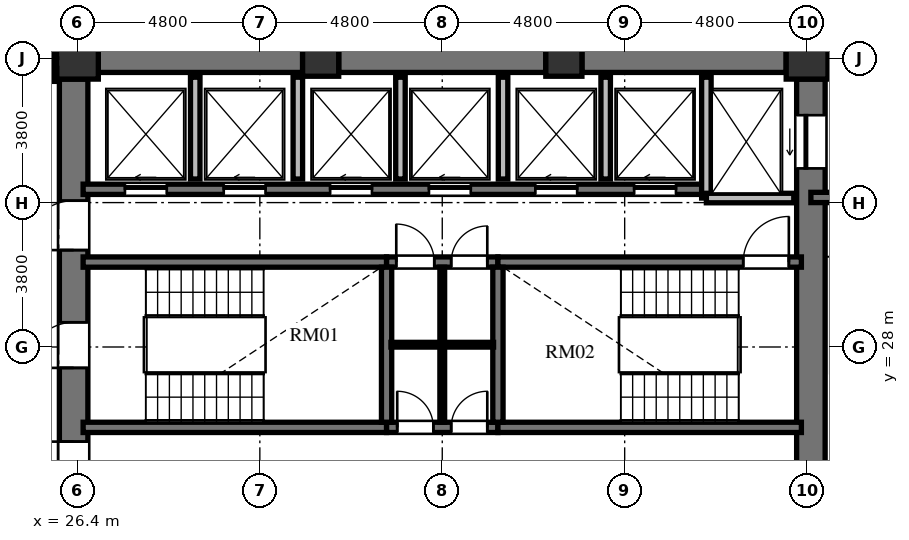
"""IFC4 building model, lengths in metres.
Left out: names, types, materials, properties, quantities, classifications, styles, units other than length and angle.
Written with IfcOpenShell. Run it as: python <this file> out.ifc"""

import sys

from ifc_helpers import new_model, si_unit, direction, frame, frame_2d, origin, origin_2d, place, context, subcontext, project, spatial, rectangle, extrude, element, fill, save


model = new_model("IFC4")
c1 = context("Model", 3, precision=1e-05, world=origin(), true_north=direction((0.0, 1.0)))
c2 = subcontext(c1, "Body", "Model", "MODEL_VIEW")
j1 = project(units=[si_unit("LENGTHUNIT", "METRE"), si_unit("PLANEANGLEUNIT", "RADIAN")], contexts=[c1])
p1 = place(None, origin())
s1 = spatial("IfcSite", under=j1, at=p1, CompositionType="ELEMENT")
p2 = place(p1, origin())
s2 = spatial("IfcBuilding", under=s1, at=p2, CompositionType="ELEMENT")
p3 = place(p2, frame((0.0, 0.0, 114.576)))
s3 = spatial("IfcBuildingStorey", under=s2, at=p3, CompositionType="ELEMENT", Elevation=114.576)
p4 = place(p3, frame((45.6, 35.6, 0.0), z_axis=(0.0, 0.0, 1.0), x_axis=(1.0, 0.0, 0.0)))
e1 = element("IfcColumn", 1, at=p4, inside=s3, PredefinedType="COLUMN", context=c2, shape_type="SweptSolid", body=[
    extrude(rectangle(XDim=1.1, YDim=1.1, at=origin_2d()), origin(), (0.0, 0.0, 1.0), 3.648),
])
for number, where, z_axis, x_axis in (
    (2, (39.2, 35.6, 0.0), (0.0, 0.0, 1.0), (1.0, 0.0, 0.0)),
    (3, (32.8, 35.6, 0.0), (0.0, 0.0, 1.0), (1.0, 0.0, 0.0)),
):
    element("IfcColumn", number, at=place(p3, frame(where, z_axis=z_axis, x_axis=x_axis)), inside=s3, PredefinedType="COLUMN", context=c2, shape_type="SweptSolid", body=[
        extrude(rectangle(XDim=0.95, YDim=0.95, at=origin_2d()), origin(), (0.0, 0.0, 1.0), 3.648),
    ])
p5 = place(p3, frame((26.4, 35.6, 0.0), z_axis=(0.0, 0.0, 1.0), x_axis=(1.0, 0.0, 0.0)))
e4 = element("IfcColumn", 4, at=p5, inside=s3, PredefinedType="COLUMN", context=c2, shape_type="SweptSolid", body=[
    extrude(rectangle(XDim=1.1, YDim=1.1, at=origin_2d()), origin(), (0.0, 0.0, 1.0), 3.648),
])
p6 = place(p3, frame((26.3, 20.95, 0.0), z_axis=(0.0, 0.0, 1.0), x_axis=(0.0, 1.0, 0.0)))
e5 = element("IfcWall", 5, at=p6, inside=s3, PredefinedType="SHEAR", context=c2, shape_type="SweptSolid", body=[
    extrude(rectangle(XDim=14.1, YDim=0.75, at=frame_2d((7.05, 0.0))), origin(), (0.0, 0.0, 1.0), 3.648),
])
p7 = place(p6, frame((6.5, 0.0, 0.0)))
e6 = element("IfcOpeningElement", 6, at=p7, cuts=e5, PredefinedType="OPENING", context=c2, shape_type="SweptSolid", body=[
    extrude(rectangle(XDim=1.2, YDim=2.15, at=frame_2d((0.6, 1.075))), frame((0.0, 0.385, 0.0), z_axis=(0.0, -1.0, 0.0), x_axis=(1.0, 0.0, 0.0)), (0.0, 0.0, 1.0), 0.77),
])
p8 = place(p6, frame((9.6, 0.0, 0.0)))
e7 = element("IfcOpeningElement", 7, at=p8, cuts=e5, PredefinedType="OPENING", context=c2, shape_type="SweptSolid", body=[
    extrude(rectangle(XDim=1.3, YDim=2.2, at=frame_2d((0.65, 1.1))), frame((0.0, 0.385, 0.0), z_axis=(0.0, -1.0, 0.0), x_axis=(1.0, 0.0, 0.0)), (0.0, 0.0, 1.0), 0.77),
])
p9 = place(p6, frame((3.26, 0.0, 0.0)))
e8 = element("IfcOpeningElement", 8, at=p9, cuts=e5, PredefinedType="OPENING", context=c2, shape_type="SweptSolid", body=[
    extrude(rectangle(XDim=1.3, YDim=2.2, at=frame_2d((0.65, 1.1))), frame((0.0, 0.385, 0.0), z_axis=(0.0, -1.0, 0.0), x_axis=(1.0, 0.0, 0.0)), (0.0, 0.0, 1.0), 0.77),
])
p10 = place(p3, frame((45.7, 20.95, 0.0), z_axis=(0.0, 0.0, 1.0), x_axis=(0.0, 1.0, 0.0)))
e9 = element("IfcWall", 9, at=p10, inside=s3, PredefinedType="SHEAR", context=c2, shape_type="SweptSolid", body=[
    extrude(rectangle(XDim=14.1, YDim=0.75, at=frame_2d((7.05, 0.0))), origin(), (0.0, 0.0, 1.0), 3.648),
])
p11 = place(p10, frame((11.75, 0.0, 0.0)))
e10 = element("IfcOpeningElement", 10, at=p11, cuts=e9, PredefinedType="OPENING", context=c2, shape_type="SweptSolid", body=[
    extrude(rectangle(XDim=1.4, YDim=2.3, at=frame_2d((0.7, 1.15))), frame((0.0, 0.385, 0.0), z_axis=(0.0, -1.0, 0.0), x_axis=(1.0, 0.0, 0.0)), (0.0, 0.0, 1.0), 0.77),
])
p12 = place(p10, frame((0.95, 0.0, 0.0)))
e11 = element("IfcOpeningElement", 11, at=p12, cuts=e9, PredefinedType="OPENING", context=c2, shape_type="SweptSolid", body=[
    extrude(rectangle(XDim=1.4, YDim=2.3, at=frame_2d((0.7, 1.15))), frame((0.0, 0.385, 0.0), z_axis=(0.0, -1.0, 0.0), x_axis=(1.0, 0.0, 0.0)), (0.0, 0.0, 1.0), 0.77),
])
p13 = place(p3, frame((26.95, 35.6, 0.0), z_axis=(0.0, 0.0, 1.0), x_axis=(1.0, 0.0, 0.0)))
e12 = element("IfcWall", 12, at=p13, inside=s3, PredefinedType="SHEAR", context=c2, shape_type="SweptSolid", body=[
    extrude(rectangle(XDim=5.375, YDim=0.75, at=frame_2d((2.688, 0.0))), origin(), (0.0, 0.0, 1.0), 3.648),
])
p14 = place(p3, frame((33.275, 35.6, 0.0), z_axis=(0.0, 0.0, 1.0), x_axis=(1.0, 0.0, 0.0)))
e13 = element("IfcWall", 13, at=p14, inside=s3, PredefinedType="SHEAR", context=c2, shape_type="SweptSolid", body=[
    extrude(rectangle(XDim=5.45, YDim=0.75, at=frame_2d((2.725, 0.0))), origin(), (0.0, 0.0, 1.0), 3.648),
])
p15 = place(p3, frame((39.675, 35.6, 0.0), z_axis=(0.0, 0.0, 1.0), x_axis=(1.0, 0.0, 0.0)))
e14 = element("IfcWall", 14, at=p15, inside=s3, PredefinedType="SHEAR", context=c2, shape_type="SweptSolid", body=[
    extrude(rectangle(XDim=5.375, YDim=0.75, at=frame_2d((2.688, 0.0))), origin(), (0.0, 0.0, 1.0), 3.648),
])
p16 = place(p3, frame((26.55, 30.235, 0.0), z_axis=(0.0, 0.0, 1.0), x_axis=(1.0, 0.0, 0.0)))
e15 = element("IfcWall", 15, at=p16, inside=s3, PredefinedType="SHEAR", context=c2, shape_type="SweptSolid", body=[
    extrude(rectangle(XDim=7.985, YDim=0.27, at=frame_2d((3.992, 0.0))), origin(), (0.0, 0.0, 1.0), 3.648),
])
p17 = place(p3, frame((34.535, 30.235, 0.0), z_axis=(0.0, 0.0, 1.0), x_axis=(1.0, 0.0, 0.0)))
e16 = element("IfcWall", 16, at=p17, inside=s3, PredefinedType="SHEAR", context=c2, shape_type="SweptSolid", body=[
    extrude(rectangle(XDim=2.93, YDim=0.27, at=frame_2d((1.465, 0.0))), origin(), (0.0, 0.0, 1.0), 3.648),
])
p18 = place(p17, frame((0.255, 0.0, 0.0)))
e17 = element("IfcOpeningElement", 17, at=p18, cuts=e16, PredefinedType="OPENING", context=c2, shape_type="SweptSolid", body=[
    extrude(rectangle(XDim=1.0, YDim=2.1, at=frame_2d((0.5, 1.05))), frame((0.0, 0.145, 0.0), z_axis=(0.0, -1.0, 0.0), x_axis=(1.0, 0.0, 0.0)), (0.0, 0.0, 1.0), 0.29),
])
p19 = place(p17, frame((1.7, 0.0, 0.0)))
e18 = element("IfcOpeningElement", 18, at=p19, cuts=e16, PredefinedType="OPENING", context=c2, shape_type="SweptSolid", body=[
    extrude(rectangle(XDim=0.95, YDim=2.1, at=frame_2d((0.475, 1.05))), frame((0.0, 0.145, 0.0), z_axis=(0.0, -1.0, 0.0), x_axis=(1.0, 0.0, 0.0)), (0.0, 0.0, 1.0), 0.29),
])
p20 = place(p3, frame((37.465, 30.235, 0.0), z_axis=(0.0, 0.0, 1.0), x_axis=(1.0, 0.0, 0.0)))
e19 = element("IfcWall", 19, at=p20, inside=s3, PredefinedType="SHEAR", context=c2, shape_type="SweptSolid", body=[
    extrude(rectangle(XDim=7.985, YDim=0.27, at=frame_2d((3.992, 0.0))), origin(), (0.0, 0.0, 1.0), 3.648),
])
p21 = place(p20, frame((6.455, 0.0, 0.0)))
e20 = element("IfcOpeningElement", 20, at=p21, cuts=e19, PredefinedType="OPENING", context=c2, shape_type="SweptSolid", body=[
    extrude(rectangle(XDim=1.2, YDim=2.15, at=frame_2d((0.6, 1.075))), frame((0.0, 0.145, 0.0), z_axis=(0.0, -1.0, 0.0), x_axis=(1.0, 0.0, 0.0)), (0.0, 0.0, 1.0), 0.29),
])
p22 = place(p3, frame((26.55, 25.885, 0.0), z_axis=(0.0, 0.0, 1.0), x_axis=(1.0, 0.0, 0.0)))
e21 = element("IfcWall", 21, at=p22, inside=s3, PredefinedType="SHEAR", context=c2, shape_type="SweptSolid", body=[
    extrude(rectangle(XDim=7.985, YDim=0.27, at=frame_2d((3.992, 0.0))), origin(), (0.0, 0.0, 1.0), 3.648),
])
p23 = place(p3, frame((34.535, 25.885, 0.0), z_axis=(0.0, 0.0, 1.0), x_axis=(1.0, 0.0, 0.0)))
e22 = element("IfcWall", 22, at=p23, inside=s3, PredefinedType="SHEAR", context=c2, shape_type="SweptSolid", body=[
    extrude(rectangle(XDim=2.93, YDim=0.27, at=frame_2d((1.465, 0.0))), origin(), (0.0, 0.0, 1.0), 3.648),
])
p24 = place(p23, frame((0.28, 0.0, 0.0)))
e23 = element("IfcOpeningElement", 23, at=p24, cuts=e22, PredefinedType="OPENING", context=c2, shape_type="SweptSolid", body=[
    extrude(rectangle(XDim=0.95, YDim=2.1, at=frame_2d((0.475, 1.05))), frame((0.0, 0.145, 0.0), z_axis=(0.0, -1.0, 0.0), x_axis=(1.0, 0.0, 0.0)), (0.0, 0.0, 1.0), 0.29),
])
p25 = place(p23, frame((1.7, 0.0, 0.0)))
e24 = element("IfcOpeningElement", 24, at=p25, cuts=e22, PredefinedType="OPENING", context=c2, shape_type="SweptSolid", body=[
    extrude(rectangle(XDim=0.95, YDim=2.1, at=frame_2d((0.475, 1.05))), frame((0.0, 0.145, 0.0), z_axis=(0.0, -1.0, 0.0), x_axis=(1.0, 0.0, 0.0)), (0.0, 0.0, 1.0), 0.29),
])
p26 = place(p3, frame((37.465, 25.885, 0.0), z_axis=(0.0, 0.0, 1.0), x_axis=(1.0, 0.0, 0.0)))
e25 = element("IfcWall", 25, at=p26, inside=s3, PredefinedType="SHEAR", context=c2, shape_type="SweptSolid", body=[
    extrude(rectangle(XDim=7.985, YDim=0.27, at=frame_2d((3.992, 0.0))), origin(), (0.0, 0.0, 1.0), 3.648),
])
for number, where, z_axis, x_axis in (
    (26, (34.535, 26.02, 0.0), (0.0, 0.0, 1.0), (0.0, 1.0, 0.0)),
    (27, (37.465, 26.02, 0.0), (0.0, 0.0, 1.0), (0.0, 1.0, 0.0)),
):
    element("IfcWall", number, at=place(p3, frame(where, z_axis=z_axis, x_axis=x_axis)), inside=s3, PredefinedType="SHEAR", context=c2, shape_type="SweptSolid", body=[
        extrude(rectangle(XDim=4.08, YDim=0.27, at=frame_2d((2.04, 0.0))), origin(), (0.0, 0.0, 1.0), 3.648),
    ])
p27 = place(p3, frame((34.65, 28.06, 0.0), z_axis=(0.0, 0.0, 1.0), x_axis=(1.0, 0.0, 0.0)))
e28 = element("IfcWall", 28, at=p27, inside=s3, PredefinedType="PARTITIONING", context=c2, shape_type="SweptSolid", body=[
    extrude(rectangle(XDim=2.7, YDim=0.125, at=frame_2d((1.35, 0.0))), origin(), (0.0, 0.0, 1.0), 3.428),
])
p28 = place(p3, frame((36.0, 26.02, 0.0), z_axis=(0.0, 0.0, 1.0), x_axis=(0.0, 1.0, 0.0)))
e29 = element("IfcWall", 29, at=p28, inside=s3, PredefinedType="PARTITIONING", context=c2, shape_type="SweptSolid", body=[
    extrude(rectangle(XDim=4.08, YDim=0.125, at=frame_2d((2.04, 0.0))), origin(), (0.0, 0.0, 1.0), 3.428),
])
p29 = place(p3, frame((26.55, 32.15, 0.0), z_axis=(0.0, 0.0, 1.0), x_axis=(1.0, 0.0, 0.0)))
e30 = element("IfcWall", 30, at=p29, inside=s3, PredefinedType="SHEAR", context=c2, shape_type="SweptSolid", body=[
    extrude(rectangle(XDim=16.4, YDim=0.27, at=frame_2d((8.2, 0.0))), origin(), (0.0, 0.0, 1.0), 3.648),
])
p30 = place(p29, frame((1.1, 0.0, 0.0)))
e31 = element("IfcOpeningElement", 31, at=p30, cuts=e30, PredefinedType="OPENING", context=c2, shape_type="SweptSolid", body=[
    extrude(rectangle(XDim=1.1, YDim=2.2, at=frame_2d((0.55, 1.1))), frame((0.0, 0.145, 0.0), z_axis=(0.0, -1.0, 0.0), x_axis=(1.0, 0.0, 0.0)), (0.0, 0.0, 1.0), 0.29),
])
p31 = place(p29, frame((3.7, 0.0, 0.0)))
e32 = element("IfcOpeningElement", 32, at=p31, cuts=e30, PredefinedType="OPENING", context=c2, shape_type="SweptSolid", body=[
    extrude(rectangle(XDim=1.1, YDim=2.2, at=frame_2d((0.55, 1.1))), frame((0.0, 0.145, 0.0), z_axis=(0.0, -1.0, 0.0), x_axis=(1.0, 0.0, 0.0)), (0.0, 0.0, 1.0), 0.29),
])
p32 = place(p29, frame((6.5, 0.0, 0.0)))
e33 = element("IfcOpeningElement", 33, at=p32, cuts=e30, PredefinedType="OPENING", context=c2, shape_type="SweptSolid", body=[
    extrude(rectangle(XDim=1.1, YDim=2.2, at=frame_2d((0.55, 1.1))), frame((0.0, 0.145, 0.0), z_axis=(0.0, -1.0, 0.0), x_axis=(1.0, 0.0, 0.0)), (0.0, 0.0, 1.0), 0.29),
])
p33 = place(p29, frame((9.1, 0.0, 0.0)))
e34 = element("IfcOpeningElement", 34, at=p33, cuts=e30, PredefinedType="OPENING", context=c2, shape_type="SweptSolid", body=[
    extrude(rectangle(XDim=1.1, YDim=2.2, at=frame_2d((0.55, 1.1))), frame((0.0, 0.145, 0.0), z_axis=(0.0, -1.0, 0.0), x_axis=(1.0, 0.0, 0.0)), (0.0, 0.0, 1.0), 0.29),
])
p34 = place(p29, frame((11.9, 0.0, 0.0)))
e35 = element("IfcOpeningElement", 35, at=p34, cuts=e30, PredefinedType="OPENING", context=c2, shape_type="SweptSolid", body=[
    extrude(rectangle(XDim=1.1, YDim=2.2, at=frame_2d((0.55, 1.1))), frame((0.0, 0.145, 0.0), z_axis=(0.0, -1.0, 0.0), x_axis=(1.0, 0.0, 0.0)), (0.0, 0.0, 1.0), 0.29),
])
p35 = place(p29, frame((14.5, 0.0, 0.0)))
e36 = element("IfcOpeningElement", 36, at=p35, cuts=e30, PredefinedType="OPENING", context=c2, shape_type="SweptSolid", body=[
    extrude(rectangle(XDim=1.1, YDim=2.2, at=frame_2d((0.55, 1.1))), frame((0.0, 0.145, 0.0), z_axis=(0.0, -1.0, 0.0), x_axis=(1.0, 0.0, 0.0)), (0.0, 0.0, 1.0), 0.29),
])
p36 = place(p3, frame((42.95, 31.92, 0.0), z_axis=(0.0, 0.0, 1.0), x_axis=(0.0, 1.0, 0.0)))
e37 = element("IfcWall", 37, at=p36, inside=s3, PredefinedType="SOLIDWALL", context=c2, shape_type="SweptSolid", body=[
    extrude(rectangle(XDim=3.18, YDim=0.25, at=frame_2d((1.59, 0.0))), origin(), (0.0, 0.0, 1.0), 3.428),
])
p37 = place(p3, frame((42.95, 31.92, 0.0), z_axis=(0.0, 0.0, 1.0), x_axis=(1.0, 0.0, 0.0)))
e38 = element("IfcWall", 38, at=p37, inside=s3, PredefinedType="SOLIDWALL", context=c2, shape_type="SweptSolid", body=[
    extrude(rectangle(XDim=2.3, YDim=0.25, at=frame_2d((1.15, 0.0))), origin(), (0.0, 0.0, 1.0), 3.428),
])
for number, where, z_axis, x_axis in (
    (39, (29.5, 32.42, 0.0), (0.0, 0.0, 1.0), (0.0, 1.0, 0.0)),
    (40, (32.2, 32.42, 0.0), (0.0, 0.0, 1.0), (0.0, 1.0, 0.0)),
    (41, (34.9, 32.42, 0.0), (0.0, 0.0, 1.0), (0.0, 1.0, 0.0)),
    (42, (37.6, 32.42, 0.0), (0.0, 0.0, 1.0), (0.0, 1.0, 0.0)),
    (43, (40.3, 32.42, 0.0), (0.0, 0.0, 1.0), (0.0, 1.0, 0.0)),
):
    element("IfcWall", number, at=place(p3, frame(where, z_axis=z_axis, x_axis=x_axis)), inside=s3, PredefinedType="SOLIDWALL", context=c2, shape_type="SweptSolid", body=[
        extrude(rectangle(XDim=2.68, YDim=0.25, at=frame_2d((1.34, 0.0))), origin(), (0.0, 0.0, 1.0), 3.428),
    ])
p38 = place(p3, frame((45.7, 31.935, 0.0), z_axis=(0.0, 0.0, 1.0), x_axis=(1.0, 0.0, 0.0)))
e44 = element("IfcWall", 44, at=p38, inside=s3, PredefinedType="SHEAR", context=c2, shape_type="SweptSolid", body=[
    extrude(rectangle(XDim=4.715, YDim=0.27, at=frame_2d((2.357, 0.0))), origin(), (0.0, 0.0, 1.0), 3.648),
])
p39 = place(p3, frame((25.83, 36.21, 0.0), z_axis=(0.0, 0.0, 1.0), x_axis=(0.0, -1.0, 0.0)))
e45 = element("IfcWall", 45, at=p39, inside=s3, PredefinedType="PARTITIONING", context=c2, shape_type="SweptSolid", body=[
    extrude(rectangle(XDim=1.22, YDim=0.18, at=frame_2d((0.61, 0.0))), origin(), (0.0, 0.0, 1.0), 3.428),
])
p40 = place(p7, origin())
e46 = element("IfcDoor", 46, at=p40, inside=s3, OperationType="SINGLE_SWING_LEFT", PredefinedType="DOOR", context=c2, shape_type="SweptSolid", body=[
    extrude(rectangle(XDim=1.2, YDim=2.15, at=frame_2d((0.6, 1.075))), frame((0.0, 0.025, 0.0), z_axis=(0.0, -1.0, 0.0), x_axis=(1.0, 0.0, 0.0)), (0.0, 0.0, 1.0), 0.05),
])
fill(e6, e46)
p41 = place(p21, origin())
e47 = element("IfcDoor", 47, at=p41, inside=s3, OperationType="SINGLE_SWING_RIGHT", PredefinedType="DOOR", context=c2, shape_type="SweptSolid", body=[
    extrude(rectangle(XDim=1.2, YDim=2.15, at=frame_2d((0.6, 1.075))), frame((0.0, 0.025, 0.0), z_axis=(0.0, -1.0, 0.0), x_axis=(1.0, 0.0, 0.0)), (0.0, 0.0, 1.0), 0.05),
])
fill(e20, e47)
p42 = place(p24, origin())
e48 = element("IfcDoor", 48, at=p42, inside=s3, OperationType="SINGLE_SWING_LEFT", PredefinedType="DOOR", context=c2, shape_type="SweptSolid", body=[
    extrude(rectangle(XDim=0.95, YDim=2.1, at=frame_2d((0.475, 1.05))), frame((0.0, 0.025, 0.0), z_axis=(0.0, -1.0, 0.0), x_axis=(1.0, 0.0, 0.0)), (0.0, 0.0, 1.0), 0.05),
])
fill(e23, e48)
p43 = place(p25, origin())
e49 = element("IfcDoor", 49, at=p43, inside=s3, OperationType="SINGLE_SWING_RIGHT", PredefinedType="DOOR", context=c2, shape_type="SweptSolid", body=[
    extrude(rectangle(XDim=0.95, YDim=2.1, at=frame_2d((0.475, 1.05))), frame((0.0, 0.025, 0.0), z_axis=(0.0, -1.0, 0.0), x_axis=(1.0, 0.0, 0.0)), (0.0, 0.0, 1.0), 0.05),
])
fill(e24, e49)
p44 = place(p18, origin())
e50 = element("IfcDoor", 50, at=p44, inside=s3, OperationType="SINGLE_SWING_LEFT", PredefinedType="DOOR", context=c2, shape_type="SweptSolid", body=[
    extrude(rectangle(XDim=1.0, YDim=2.1, at=frame_2d((0.5, 1.05))), frame((0.0, 0.025, 0.0), z_axis=(0.0, -1.0, 0.0), x_axis=(1.0, 0.0, 0.0)), (0.0, 0.0, 1.0), 0.05),
])
fill(e17, e50)
p45 = place(p19, origin())
e51 = element("IfcDoor", 51, at=p45, inside=s3, OperationType="SINGLE_SWING_RIGHT", PredefinedType="DOOR", context=c2, shape_type="SweptSolid", body=[
    extrude(rectangle(XDim=0.95, YDim=2.1, at=frame_2d((0.475, 1.05))), frame((0.0, 0.025, 0.0), z_axis=(0.0, -1.0, 0.0), x_axis=(1.0, 0.0, 0.0)), (0.0, 0.0, 1.0), 0.05),
])
fill(e18, e51)
p46 = place(p8, origin())
e52 = element("IfcDoor", 52, at=p46, inside=s3, OperationType="SINGLE_SWING_LEFT", PredefinedType="DOOR", context=c2, shape_type="SweptSolid", body=[
    extrude(rectangle(XDim=1.3, YDim=2.2, at=frame_2d((0.65, 1.1))), frame((0.0, 0.025, 0.0), z_axis=(0.0, -1.0, 0.0), x_axis=(1.0, 0.0, 0.0)), (0.0, 0.0, 1.0), 0.05),
])
fill(e7, e52)
p47 = place(p9, origin())
e53 = element("IfcDoor", 53, at=p47, inside=s3, OperationType="SINGLE_SWING_RIGHT", PredefinedType="DOOR", context=c2, shape_type="SweptSolid", body=[
    extrude(rectangle(XDim=1.3, YDim=2.2, at=frame_2d((0.65, 1.1))), frame((0.0, 0.025, 0.0), z_axis=(0.0, -1.0, 0.0), x_axis=(1.0, 0.0, 0.0)), (0.0, 0.0, 1.0), 0.05),
])
fill(e8, e53)
p48 = place(p30, origin())
e54 = element("IfcDoor", 54, at=p48, inside=s3, OperationType="SLIDING_TO_LEFT", PredefinedType="DOOR", context=c2, shape_type="SweptSolid", body=[
    extrude(rectangle(XDim=1.1, YDim=2.2, at=frame_2d((0.55, 1.1))), frame((0.0, 0.025, 0.0), z_axis=(0.0, -1.0, 0.0), x_axis=(1.0, 0.0, 0.0)), (0.0, 0.0, 1.0), 0.05),
])
fill(e31, e54)
p49 = place(p31, origin())
e55 = element("IfcDoor", 55, at=p49, inside=s3, OperationType="SLIDING_TO_LEFT", PredefinedType="DOOR", context=c2, shape_type="SweptSolid", body=[
    extrude(rectangle(XDim=1.1, YDim=2.2, at=frame_2d((0.55, 1.1))), frame((0.0, 0.025, 0.0), z_axis=(0.0, -1.0, 0.0), x_axis=(1.0, 0.0, 0.0)), (0.0, 0.0, 1.0), 0.05),
])
fill(e32, e55)
p50 = place(p32, origin())
e56 = element("IfcDoor", 56, at=p50, inside=s3, OperationType="SLIDING_TO_LEFT", PredefinedType="DOOR", context=c2, shape_type="SweptSolid", body=[
    extrude(rectangle(XDim=1.1, YDim=2.2, at=frame_2d((0.55, 1.1))), frame((0.0, 0.025, 0.0), z_axis=(0.0, -1.0, 0.0), x_axis=(1.0, 0.0, 0.0)), (0.0, 0.0, 1.0), 0.05),
])
fill(e33, e56)
p51 = place(p33, origin())
e57 = element("IfcDoor", 57, at=p51, inside=s3, OperationType="SLIDING_TO_LEFT", PredefinedType="DOOR", context=c2, shape_type="SweptSolid", body=[
    extrude(rectangle(XDim=1.1, YDim=2.2, at=frame_2d((0.55, 1.1))), frame((0.0, 0.025, 0.0), z_axis=(0.0, -1.0, 0.0), x_axis=(1.0, 0.0, 0.0)), (0.0, 0.0, 1.0), 0.05),
])
fill(e34, e57)
p52 = place(p34, origin())
e58 = element("IfcDoor", 58, at=p52, inside=s3, OperationType="SLIDING_TO_LEFT", PredefinedType="DOOR", context=c2, shape_type="SweptSolid", body=[
    extrude(rectangle(XDim=1.1, YDim=2.2, at=frame_2d((0.55, 1.1))), frame((0.0, 0.025, 0.0), z_axis=(0.0, -1.0, 0.0), x_axis=(1.0, 0.0, 0.0)), (0.0, 0.0, 1.0), 0.05),
])
fill(e35, e58)
p53 = place(p35, origin())
e59 = element("IfcDoor", 59, at=p53, inside=s3, OperationType="SLIDING_TO_LEFT", PredefinedType="DOOR", context=c2, shape_type="SweptSolid", body=[
    extrude(rectangle(XDim=1.1, YDim=2.2, at=frame_2d((0.55, 1.1))), frame((0.0, 0.025, 0.0), z_axis=(0.0, -1.0, 0.0), x_axis=(1.0, 0.0, 0.0)), (0.0, 0.0, 1.0), 0.05),
])
fill(e36, e59)
p54 = place(p11, origin())
e60 = element("IfcDoor", 60, at=p54, inside=s3, OperationType="SLIDING_TO_LEFT", PredefinedType="DOOR", context=c2, shape_type="SweptSolid", body=[
    extrude(rectangle(XDim=1.4, YDim=2.3, at=frame_2d((0.7, 1.15))), frame((0.0, 0.025, 0.0), z_axis=(0.0, -1.0, 0.0), x_axis=(1.0, 0.0, 0.0)), (0.0, 0.0, 1.0), 0.05),
])
fill(e10, e60)
save(model, sys.argv[1])
